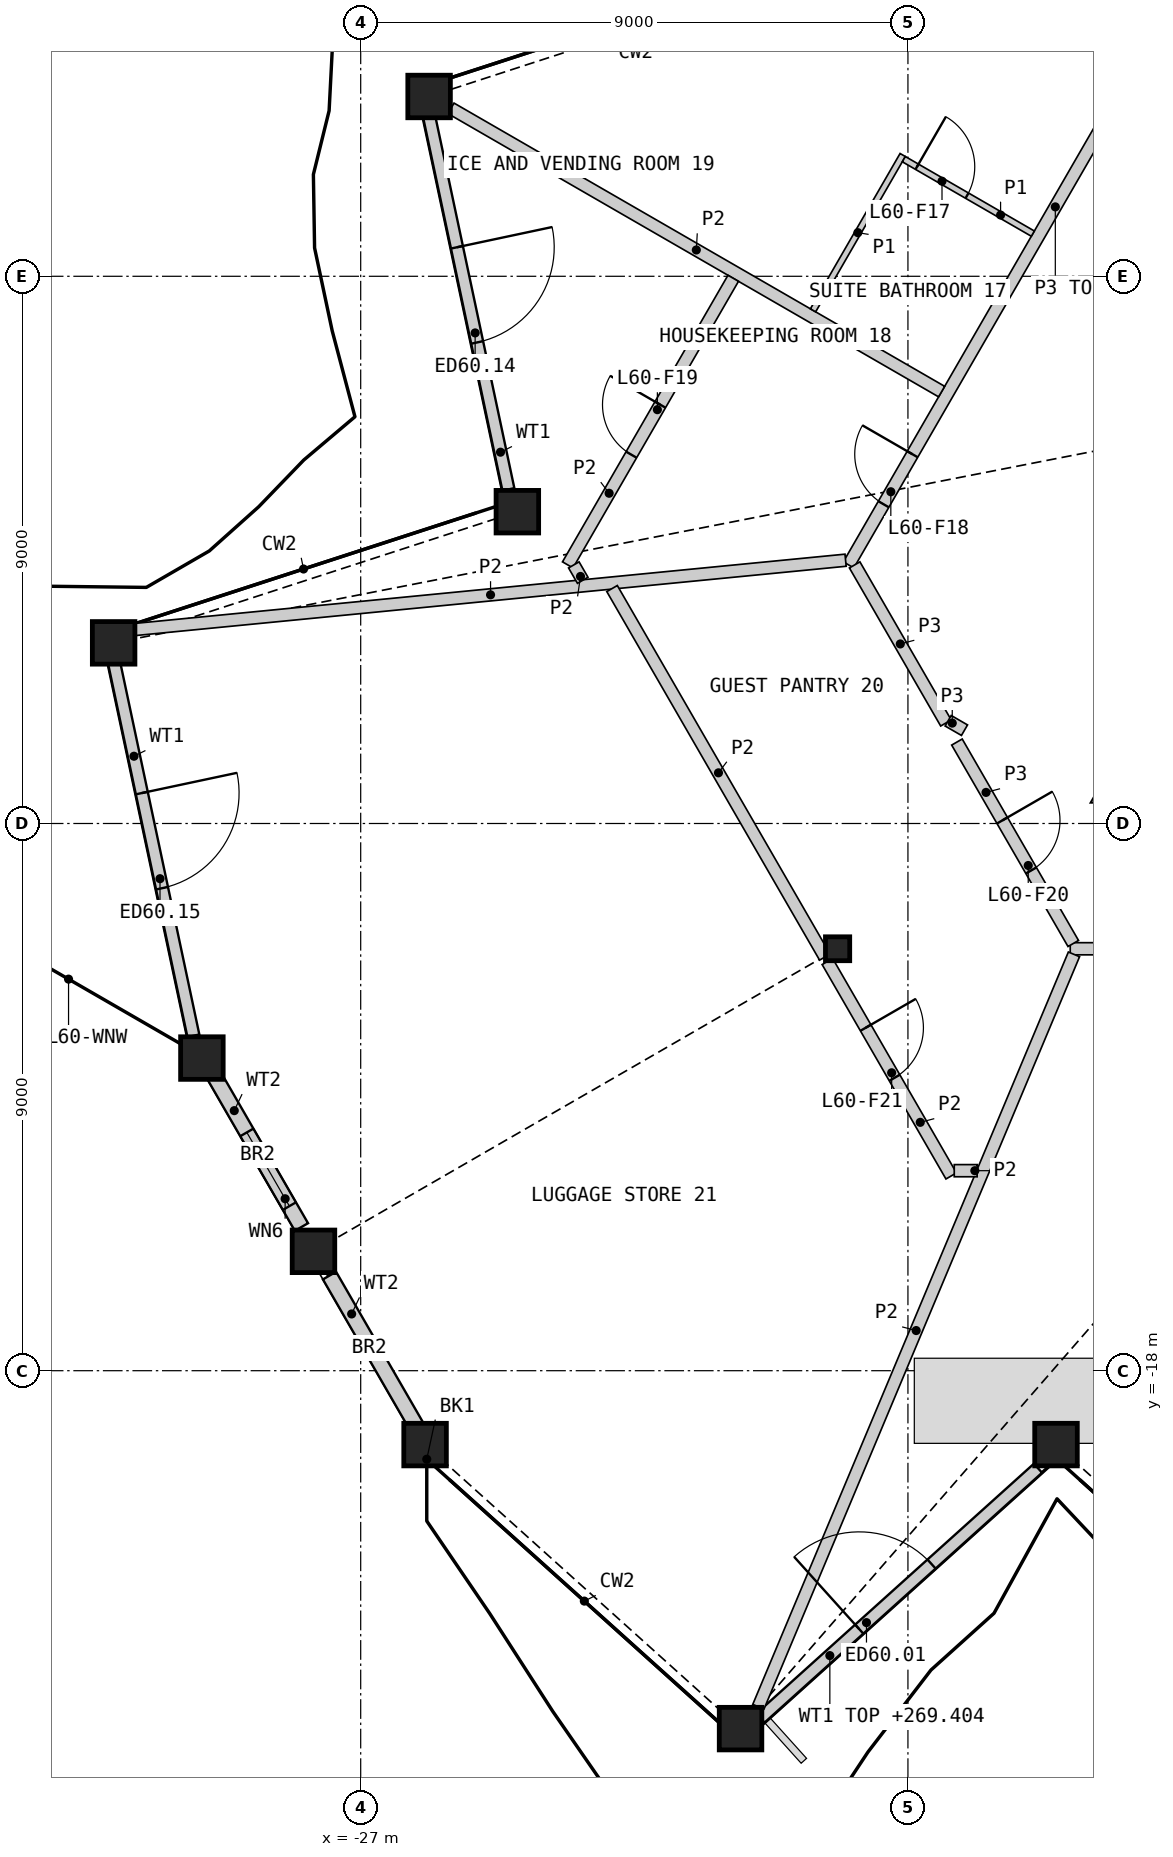
"""IFC4 building model, lengths in metres.
Left out: names, types, materials, properties, quantities, classifications, styles, units other than length and angle.
Written with IfcOpenShell. Run it as: python <this file> out.ifc"""

import sys

from ifc_helpers import new_model, si_unit, direction, frame, frame_2d, origin, origin_2d, place, context, subcontext, project, spatial, polyline, rectangle, hollow_rectangle, i_section, outline, extrude, element, fill, save


model = new_model("IFC4")
c1 = context("Model", 3, precision=1e-05, world=origin(), true_north=direction((0.0, 1.0)))
c2 = subcontext(c1, "Body", "Model", "MODEL_VIEW")
j1 = project(units=[si_unit("LENGTHUNIT", "METRE"), si_unit("PLANEANGLEUNIT", "RADIAN")], contexts=[c1])
p1 = place(None, origin())
s1 = spatial("IfcSite", under=j1, at=p1, CompositionType="ELEMENT")
p2 = place(p1, origin())
s2 = spatial("IfcBuilding", under=s1, at=p2, CompositionType="ELEMENT")
p3 = place(p2, frame((0.0, 0.0, 267.0)))
s3 = spatial("IfcBuildingStorey", under=s2, at=p3, CompositionType="ELEMENT", Elevation=267.0)
for number, where, z_axis, x_axis in (
    (1, (-25.941, -19.215, 0.0), (0.0, 0.0, 1.0), (1.0, 0.0, 0.0)),
    (2, (-20.753, -23.887, 0.0), (0.0, 0.0, 1.0), (1.0, 0.0, 0.0)),
    (3, (-15.565, -19.215, 0.0), (0.0, 0.0, 1.0), (1.0, 0.0, 0.0)),
    (4, (-25.875, 2.957, 0.0), (0.0, 0.0, 1.0), (1.0, 0.0, 0.0)),
    (5, (-24.423, -3.872, 0.0), (0.0, 0.0, 1.0), (1.0, 0.0, 0.0)),
    (6, (-31.063, -6.029, 0.0), (0.0, 0.0, 1.0), (1.0, 0.0, 0.0)),
    (7, (-29.612, -12.858, 0.0), (0.0, 0.0, 1.0), (1.0, 0.0, 0.0)),
    (8, (-27.776, -16.037, 0.0), (0.0, 0.0, 1.0), (1.0, 0.0, 0.0)),
):
    element("IfcColumn", number, at=place(p3, frame(where, z_axis=z_axis, x_axis=x_axis)), inside=s3, PredefinedType="COLUMN", context=c2, shape_type="SweptSolid", body=[
        extrude(hollow_rectangle(XDim=0.7, YDim=0.7, WallThickness=0.045, at=origin_2d()), origin(), (0.0, 0.0, 1.0), 3.6),
    ])
p4 = place(p3, frame((-19.157, -11.06, 0.0), z_axis=(0.0, 0.0, 1.0), x_axis=(1.0, 0.0, 0.0)))
e9 = element("IfcColumn", 9, at=p4, inside=s3, PredefinedType="COLUMN", context=c2, shape_type="SweptSolid", body=[
    extrude(i_section(OverallWidth=0.399, OverallDepth=0.393, WebThickness=0.023, FlangeThickness=0.037, at=origin_2d()), origin(), (0.0, 0.0, 1.0), 3.6),
])
p5 = place(p3, frame((-20.425, -23.713, 0.0), z_axis=(0.0, 0.0, 1.0), x_axis=(0.74316565197, 0.669107475472, 0.0)))
e10 = element("IfcWall", 10, at=p5, inside=s3, PredefinedType="SOLIDWALL", context=c2, shape_type="SweptSolid", body=[
    extrude(rectangle(XDim=6.142, YDim=0.2, at=frame_2d((3.071, 0.0))), origin(), (0.0, 0.0, 1.0), 2.404),
])
p6 = place(p5, frame((2.186, 0.0, 0.0)))
e11 = element("IfcOpeningElement", 11, at=p6, cuts=e10, PredefinedType="OPENING", context=c2, shape_type="SweptSolid", body=[
    extrude(rectangle(XDim=1.6, YDim=2.4, at=frame_2d((0.8, 1.2))), frame((0.0, 0.11, 0.0), z_axis=(0.0, -1.0, 0.0), x_axis=(1.0, 0.0, 0.0)), (0.0, 0.0, 1.0), 0.22),
])
p7 = place(p3, frame((-25.872, 2.615, 0.0), z_axis=(0.0, 0.0, 1.0), x_axis=(0.207882087744, -0.978153892593, 0.0)))
e12 = element("IfcWall", 12, at=p7, inside=s3, PredefinedType="SOLIDWALL", context=c2, shape_type="SweptSolid", body=[
    extrude(rectangle(XDim=6.257, YDim=0.2, at=frame_2d((3.129, 0.0))), origin(), (0.0, 0.0, 1.0), 2.701),
])
p8 = place(p7, frame((2.186, 0.0, 0.0)))
e13 = element("IfcOpeningElement", 13, at=p8, cuts=e12, PredefinedType="OPENING", context=c2, shape_type="SweptSolid", body=[
    extrude(rectangle(XDim=1.6, YDim=2.4, at=frame_2d((0.8, 1.2))), frame((0.0, 0.11, 0.0), z_axis=(0.0, -1.0, 0.0), x_axis=(1.0, 0.0, 0.0)), (0.0, 0.0, 1.0), 0.22),
])
p9 = place(p3, frame((-31.054, -6.361, 0.0), z_axis=(0.0, 0.0, 1.0), x_axis=(0.207937956549, -0.978142017412, 0.0)))
e14 = element("IfcWall", 14, at=p9, inside=s3, PredefinedType="SOLIDWALL", context=c2, shape_type="SweptSolid", body=[
    extrude(rectangle(XDim=6.267, YDim=0.2, at=frame_2d((3.134, 0.0))), origin(), (0.0, 0.0, 1.0), 2.701),
])
p10 = place(p9, frame((2.186, 0.0, 0.0)))
e15 = element("IfcOpeningElement", 15, at=p10, cuts=e14, PredefinedType="OPENING", context=c2, shape_type="SweptSolid", body=[
    extrude(rectangle(XDim=1.6, YDim=2.4, at=frame_2d((0.8, 1.2))), frame((0.0, 0.11, 0.0), z_axis=(0.0, -1.0, 0.0), x_axis=(1.0, 0.0, 0.0)), (0.0, 0.0, 1.0), 0.22),
])
p11 = place(p3, frame((-29.448, -13.085, 0.0), z_axis=(0.0, 0.0, 1.0), x_axis=(0.499971101808, -0.86604208752, 0.0)))
e16 = element("IfcWall", 16, at=p11, inside=s3, PredefinedType="SOLIDWALL", context=c2, shape_type="SweptSolid", body=[
    extrude(rectangle(XDim=2.947, YDim=0.25, at=frame_2d((1.473, 0.0))), origin(), (0.0, 0.0, 1.0), 2.701),
])
p12 = place(p11, frame((1.15, 0.0, 1.9)))
e17 = element("IfcOpeningElement", 17, at=p12, cuts=e16, PredefinedType="OPENING", context=c2, shape_type="SweptSolid", body=[
    extrude(rectangle(XDim=1.4, YDim=0.6, at=frame_2d((0.7, 0.3))), frame((0.0, 0.135, 0.0), z_axis=(0.0, -1.0, 0.0), x_axis=(1.0, 0.0, 0.0)), (0.0, 0.0, 1.0), 0.27),
])
p13 = place(p3, frame((-27.513, -16.436, 0.0), z_axis=(0.0, 0.0, 1.0), x_axis=(0.499949632511, -0.866054481515, 0.0)))
e18 = element("IfcWall", 18, at=p13, inside=s3, PredefinedType="SOLIDWALL", context=c2, shape_type="SweptSolid", body=[
    extrude(rectangle(XDim=2.915, YDim=0.25, at=frame_2d((1.458, 0.0))), origin(), (0.0, 0.0, 1.0), 2.701),
])
p14 = place(p3, origin())
e19 = element("IfcWall", 19, at=p14, inside=s3, PredefinedType="SHEAR", context=c2, shape_type="SweptSolid", body=[
    extrude(outline(polyline([(-13.874, -6.71), (-12.748, -7.36), (-12.748, -8.66), (-15.0, -8.66), (-13.874, -6.71)])), origin(), (0.0, 0.0, 1.0), 3.25),
])
p15 = place(p3, frame((-18.976, -4.747, 0.0), z_axis=(0.0, 0.0, 1.0), x_axis=(0.499999852422, 0.866025488988, 0.0)))
e20 = element("IfcWall", 20, at=p15, inside=s3, PredefinedType="PARTITIONING", context=c2, shape_type="SweptSolid", body=[
    extrude(rectangle(XDim=27.198, YDim=0.2, at=frame_2d((13.599, 0.0))), origin(), (0.0, 0.0, 1.0), 3.25),
])
p16 = place(p15, frame((19.886, 0.0, 0.0)))
e21 = element("IfcOpeningElement", 21, at=p16, cuts=e20, PredefinedType="OPENING", context=c2, shape_type="SweptSolid", body=[
    extrude(rectangle(XDim=0.95, YDim=2.1, at=frame_2d((0.475, 1.05))), frame((0.0, 0.11, 0.0), z_axis=(0.0, -1.0, 0.0), x_axis=(1.0, 0.0, 0.0)), (0.0, 0.0, 1.0), 0.22),
])
p17 = place(p15, frame((11.895, 0.0, 0.0)))
e22 = element("IfcOpeningElement", 22, at=p17, cuts=e20, PredefinedType="OPENING", context=c2, shape_type="SweptSolid", body=[
    extrude(rectangle(XDim=1.1, YDim=2.1, at=frame_2d((0.55, 1.05))), frame((0.0, 0.11, 0.0), z_axis=(0.0, -1.0, 0.0), x_axis=(1.0, 0.0, 0.0)), (0.0, 0.0, 1.0), 0.22),
])
p18 = place(p15, frame((1.152, 0.0, 0.0)))
e23 = element("IfcOpeningElement", 23, at=p18, cuts=e20, PredefinedType="OPENING", context=c2, shape_type="SweptSolid", body=[
    extrude(rectangle(XDim=0.95, YDim=2.1, at=frame_2d((0.475, 1.05))), frame((0.0, 0.11, 0.0), z_axis=(0.0, -1.0, 0.0), x_axis=(1.0, 0.0, 0.0)), (0.0, 0.0, 1.0), 0.22),
])
p19 = place(p3, frame((-15.331, -11.06, 0.0), z_axis=(0.0, 0.0, 1.0), x_axis=(1.0, 0.0, 0.0)))
e24 = element("IfcWall", 24, at=p19, inside=s3, PredefinedType="PARTITIONING", context=c2, shape_type="SweptSolid", body=[
    extrude(rectangle(XDim=5.543, YDim=0.2, at=frame_2d((2.771, 0.0))), origin(), (0.0, 0.0, 1.0), 3.25),
])
p20 = place(p19, frame((1.973, 0.0, 0.0)))
e25 = element("IfcOpeningElement", 25, at=p20, cuts=e24, PredefinedType="OPENING", context=c2, shape_type="SweptSolid", body=[
    extrude(rectangle(XDim=1.8, YDim=2.1, at=frame_2d((0.9, 1.05))), frame((0.0, 0.11, 0.0), z_axis=(0.0, -1.0, 0.0), x_axis=(1.0, 0.0, 0.0)), (0.0, 0.0, 1.0), 0.22),
])
p21 = place(p3, frame((-17.194, -7.66, 0.0), z_axis=(0.0, 0.0, 1.0), x_axis=(0.499989446428, -0.866031496806, 0.0)))
e26 = element("IfcWall", 26, at=p21, inside=s3, PredefinedType="PARTITIONING", context=c2, shape_type="SweptSolid", body=[
    extrude(rectangle(XDim=3.826, YDim=0.2, at=frame_2d((1.913, 0.0))), origin(), (0.0, 0.0, 1.0), 3.25),
])
p22 = place(p21, frame((1.49, 0.0, 0.0)))
e27 = element("IfcOpeningElement", 27, at=p22, cuts=e26, PredefinedType="OPENING", context=c2, shape_type="SweptSolid", body=[
    extrude(rectangle(XDim=0.95, YDim=2.1, at=frame_2d((0.475, 1.05))), frame((0.0, 0.11, 0.0), z_axis=(0.0, -1.0, 0.0), x_axis=(1.0, 0.0, 0.0)), (0.0, 0.0, 1.0), 0.22),
])
p23 = place(p3, frame((-18.876, -4.747, 0.0), z_axis=(0.0, 0.0, 1.0), x_axis=(0.499952404951, -0.866052881055, 0.0)))
e28 = element("IfcWall", 28, at=p23, inside=s3, PredefinedType="PARTITIONING", context=c2, shape_type="SweptSolid", body=[
    extrude(rectangle(XDim=3.002, YDim=0.2, at=frame_2d((1.501, 0.0))), origin(), (0.0, 0.0, 1.0), 3.25),
])
p24 = place(p3, frame((-17.338, -7.31, 0.0), z_axis=(0.0, 0.0, 1.0), x_axis=(0.866054481515, -0.499949632511, 0.0)))
e29 = element("IfcWall", 29, at=p24, inside=s3, PredefinedType="PARTITIONING", context=c2, shape_type="SweptSolid", body=[
    extrude(rectangle(XDim=0.31, YDim=0.2, at=frame_2d((0.155, 0.0))), origin(), (0.0, 0.0, 1.0), 3.25),
])
p25 = place(p3, frame((-20.46, -23.527, 0.0), z_axis=(0.0, 0.0, 1.0), x_axis=(0.386788567553, 0.922168424969, 0.0)))
e30 = element("IfcWall", 30, at=p25, inside=s3, PredefinedType="PARTITIONING", context=c2, shape_type="SweptSolid", body=[
    extrude(rectangle(XDim=13.419, YDim=0.2, at=frame_2d((6.709, 0.0))), origin(), (0.0, 0.0, 1.0), 2.404),
])
p26 = place(p3, frame((-30.703, -5.809, 0.0), z_axis=(0.0, 0.0, 1.0), x_axis=(0.99527973335, 0.097047680974, 0.0)))
e31 = element("IfcWall", 31, at=p26, inside=s3, PredefinedType="PARTITIONING", context=c2, shape_type="SweptSolid", body=[
    extrude(rectangle(XDim=11.733, YDim=0.2, at=frame_2d((5.867, 0.0))), origin(), (0.0, 0.0, 1.0), 2.404),
])
p27 = place(p3, frame((-25.515, 2.762, 0.0), z_axis=(0.0, 0.0, 1.0), x_axis=(0.866025446298, -0.499999926364, 0.0)))
e32 = element("IfcWall", 32, at=p27, inside=s3, PredefinedType="PARTITIONING", context=c2, shape_type="SweptSolid", body=[
    extrude(rectangle(XDim=9.317, YDim=0.2, at=frame_2d((4.659, 0.0))), origin(), (0.0, 0.0, 1.0), 2.404),
])
p28 = place(p3, frame((-22.866, -5.136, 0.0), z_axis=(0.0, 0.0, 1.0), x_axis=(0.499988162555, -0.866032238029, 0.0)))
e33 = element("IfcWall", 33, at=p28, inside=s3, PredefinedType="PARTITIONING", context=c2, shape_type="SweptSolid", body=[
    extrude(rectangle(XDim=6.999, YDim=0.2, at=frame_2d((3.5, 0.0))), origin(), (0.0, 0.0, 1.0), 2.404),
])
p29 = place(p3, frame((-23.595, -4.747, 0.0), z_axis=(0.0, 0.0, 1.0), x_axis=(0.500003308737, 0.866023493476, 0.0)))
e34 = element("IfcWall", 34, at=p29, inside=s3, PredefinedType="PARTITIONING", context=c2, shape_type="SweptSolid", body=[
    extrude(rectangle(XDim=5.443, YDim=0.2, at=frame_2d((2.721, 0.0))), origin(), (0.0, 0.0, 1.0), 2.404),
])
p30 = place(p29, frame((2.093, 0.0, 0.0)))
e35 = element("IfcOpeningElement", 35, at=p30, cuts=e34, PredefinedType="OPENING", context=c2, shape_type="SweptSolid", body=[
    extrude(rectangle(XDim=0.95, YDim=2.1, at=frame_2d((0.475, 1.05))), frame((0.0, 0.11, 0.0), z_axis=(0.0, -1.0, 0.0), x_axis=(1.0, 0.0, 0.0)), (0.0, 0.0, 1.0), 0.22),
])
p31 = place(p3, frame((-19.325, -11.27, 0.0), z_axis=(0.0, 0.0, 1.0), x_axis=(0.500000928893, -0.866024867487, 0.0)))
e36 = element("IfcWall", 36, at=p31, inside=s3, PredefinedType="PARTITIONING", context=c2, shape_type="SweptSolid", body=[
    extrude(rectangle(XDim=4.073, YDim=0.2, at=frame_2d((2.036, 0.0))), origin(), (0.0, 0.0, 1.0), 2.404),
])
p32 = place(p31, frame((1.259, 0.0, 0.0)))
e37 = element("IfcOpeningElement", 37, at=p32, cuts=e36, PredefinedType="OPENING", context=c2, shape_type="SweptSolid", body=[
    extrude(rectangle(XDim=0.95, YDim=2.1, at=frame_2d((0.475, 1.05))), frame((0.0, 0.11, 0.0), z_axis=(0.0, -1.0, 0.0), x_axis=(1.0, 0.0, 0.0)), (0.0, 0.0, 1.0), 0.22),
])
p33 = place(p3, frame((-17.238, -14.71, 0.0), z_axis=(0.0, 0.0, 1.0), x_axis=(1.0, 0.0, 0.0)))
e38 = element("IfcWall", 38, at=p33, inside=s3, PredefinedType="PARTITIONING", context=c2, shape_type="SweptSolid", body=[
    extrude(rectangle(XDim=0.376, YDim=0.2, at=frame_2d((0.188, 0.0))), origin(), (0.0, 0.0, 1.0), 2.404),
])
p34 = place(p3, frame((-23.495, -4.747, 0.0), z_axis=(0.0, 0.0, 1.0), x_axis=(0.500180211149, -0.865921333826, 0.0)))
e39 = element("IfcWall", 39, at=p34, inside=s3, PredefinedType="PARTITIONING", context=c2, shape_type="SweptSolid", body=[
    extrude(rectangle(XDim=0.292, YDim=0.2, at=frame_2d((0.146, 0.0))), origin(), (0.0, 0.0, 1.0), 2.404),
])
p35 = place(p3, frame((-19.561, -0.56, 0.0), z_axis=(0.0, 0.0, 1.0), x_axis=(0.49997559174, 0.866039495442, 0.0)))
e40 = element("IfcWall", 40, at=p35, inside=s3, PredefinedType="PARTITIONING", context=c2, shape_type="SweptSolid", body=[
    extrude(rectangle(XDim=2.95, YDim=0.1, at=frame_2d((1.475, 0.0))), origin(), (0.0, 0.0, 1.0), 2.404),
])
p36 = place(p3, frame((-18.068, 1.927, 0.0), z_axis=(0.0, 0.0, 1.0), x_axis=(0.866014668023, -0.500018594424, 0.0)))
e41 = element("IfcWall", 41, at=p36, inside=s3, PredefinedType="PARTITIONING", context=c2, shape_type="SweptSolid", body=[
    extrude(rectangle(XDim=2.45, YDim=0.1, at=frame_2d((1.225, 0.0))), origin(), (0.0, 0.0, 1.0), 2.404),
])
p37 = place(p36, frame((0.25, 0.0, 0.0)))
e42 = element("IfcOpeningElement", 42, at=p37, cuts=e41, PredefinedType="OPENING", context=c2, shape_type="SweptSolid", body=[
    extrude(rectangle(XDim=0.95, YDim=2.1, at=frame_2d((0.475, 1.05))), frame((0.0, 0.06, 0.0), z_axis=(0.0, -1.0, 0.0), x_axis=(1.0, 0.0, 0.0)), (0.0, 0.0, 1.0), 0.12),
])
p38 = place(p6, origin())
e43 = element("IfcDoor", 43, at=p38, inside=s3, OperationType="DOUBLE_DOOR_SINGLE_SWING", PredefinedType="DOOR", context=c2, shape_type="SweptSolid", body=[
    extrude(rectangle(XDim=1.6, YDim=2.4, at=frame_2d((0.8, 1.2))), frame((0.0, 0.025, 0.0), z_axis=(0.0, -1.0, 0.0), x_axis=(1.0, 0.0, 0.0)), (0.0, 0.0, 1.0), 0.05),
])
fill(e11, e43)
p39 = place(p8, origin())
e44 = element("IfcDoor", 44, at=p39, inside=s3, OperationType="DOUBLE_DOOR_SINGLE_SWING", PredefinedType="DOOR", context=c2, shape_type="SweptSolid", body=[
    extrude(rectangle(XDim=1.6, YDim=2.4, at=frame_2d((0.8, 1.2))), frame((0.0, 0.025, 0.0), z_axis=(0.0, -1.0, 0.0), x_axis=(1.0, 0.0, 0.0)), (0.0, 0.0, 1.0), 0.05),
])
fill(e13, e44)
p40 = place(p10, origin())
e45 = element("IfcDoor", 45, at=p40, inside=s3, OperationType="DOUBLE_DOOR_SINGLE_SWING", PredefinedType="DOOR", context=c2, shape_type="SweptSolid", body=[
    extrude(rectangle(XDim=1.6, YDim=2.4, at=frame_2d((0.8, 1.2))), frame((0.0, 0.025, 0.0), z_axis=(0.0, -1.0, 0.0), x_axis=(1.0, 0.0, 0.0)), (0.0, 0.0, 1.0), 0.05),
])
fill(e15, e45)
p41 = place(p12, origin())
e46 = element("IfcWindow", 46, at=p41, inside=s3, PartitioningType="SINGLE_PANEL", PredefinedType="WINDOW", context=c2, shape_type="SweptSolid", body=[
    extrude(rectangle(XDim=1.4, YDim=0.6, at=frame_2d((0.7, 0.3))), frame((0.0, 0.03, 0.0), z_axis=(0.0, -1.0, 0.0), x_axis=(1.0, 0.0, 0.0)), (0.0, 0.0, 1.0), 0.06),
])
fill(e17, e46)
p42 = place(p37, origin())
e47 = element("IfcDoor", 47, at=p42, inside=s3, OperationType="SINGLE_SWING_LEFT", PredefinedType="DOOR", context=c2, shape_type="SweptSolid", body=[
    extrude(rectangle(XDim=0.95, YDim=2.1, at=frame_2d((0.475, 1.05))), frame((0.0, 0.025, 0.0), z_axis=(0.0, -1.0, 0.0), x_axis=(1.0, 0.0, 0.0)), (0.0, 0.0, 1.0), 0.05),
])
fill(e42, e47)
p43 = place(p18, origin())
e48 = element("IfcDoor", 48, at=p43, inside=s3, OperationType="SINGLE_SWING_RIGHT", PredefinedType="DOOR", context=c2, shape_type="SweptSolid", body=[
    extrude(rectangle(XDim=0.95, YDim=2.1, at=frame_2d((0.475, 1.05))), frame((0.0, 0.025, 0.0), z_axis=(0.0, -1.0, 0.0), x_axis=(1.0, 0.0, 0.0)), (0.0, 0.0, 1.0), 0.05),
])
fill(e23, e48)
p44 = place(p30, origin())
e49 = element("IfcDoor", 49, at=p44, inside=s3, OperationType="SINGLE_SWING_RIGHT", PredefinedType="DOOR", context=c2, shape_type="SweptSolid", body=[
    extrude(rectangle(XDim=0.95, YDim=2.1, at=frame_2d((0.475, 1.05))), frame((0.0, 0.025, 0.0), z_axis=(0.0, -1.0, 0.0), x_axis=(1.0, 0.0, 0.0)), (0.0, 0.0, 1.0), 0.05),
])
fill(e35, e49)
p45 = place(p22, origin())
e50 = element("IfcDoor", 50, at=p45, inside=s3, OperationType="SINGLE_SWING_LEFT", PredefinedType="DOOR", context=c2, shape_type="SweptSolid", body=[
    extrude(rectangle(XDim=0.95, YDim=2.1, at=frame_2d((0.475, 1.05))), frame((0.0, 0.025, 0.0), z_axis=(0.0, -1.0, 0.0), x_axis=(1.0, 0.0, 0.0)), (0.0, 0.0, 1.0), 0.05),
])
fill(e27, e50)
p46 = place(p32, origin())
e51 = element("IfcDoor", 51, at=p46, inside=s3, OperationType="SINGLE_SWING_LEFT", PredefinedType="DOOR", context=c2, shape_type="SweptSolid", body=[
    extrude(rectangle(XDim=0.95, YDim=2.1, at=frame_2d((0.475, 1.05))), frame((0.0, 0.025, 0.0), z_axis=(0.0, -1.0, 0.0), x_axis=(1.0, 0.0, 0.0)), (0.0, 0.0, 1.0), 0.05),
])
fill(e37, e51)
save(model, sys.argv[1])
